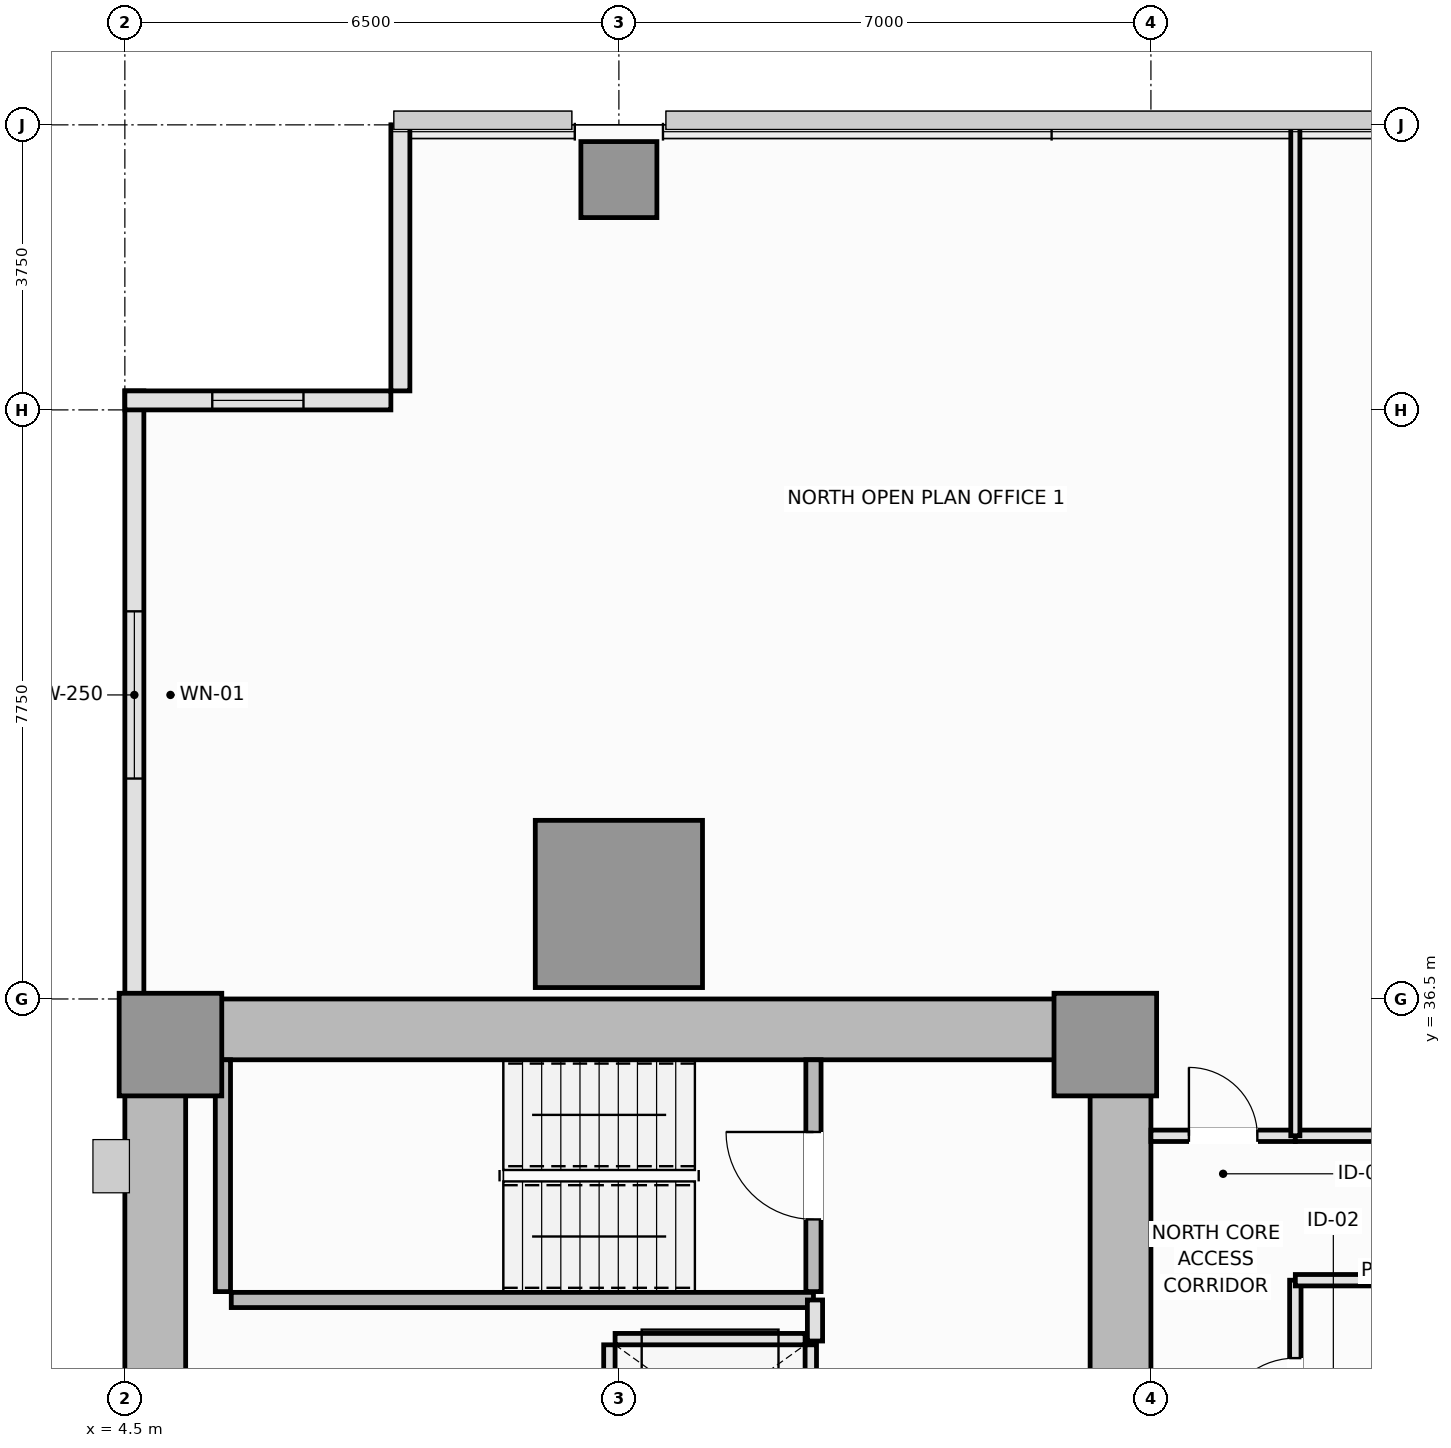
"""IFC4 building model, lengths in metres.
Left out: names, types, materials, properties, quantities, classifications, styles, units other than length and angle.
Written with IfcOpenShell. Run it as: python <this file> out.ifc"""

import sys

from ifc_helpers import new_model, si_unit, direction, frame, frame_2d, origin, origin_2d, place, context, subcontext, project, spatial, rectangle, extrude, element, fill, save


model = new_model("IFC4")
c1 = context("Model", 3, precision=1e-05, world=origin(), true_north=direction((0.0, 1.0)))
c2 = subcontext(c1, "Body", "Model", "MODEL_VIEW")
j1 = project(units=[si_unit("LENGTHUNIT", "METRE"), si_unit("PLANEANGLEUNIT", "RADIAN")], contexts=[c1])
p1 = place(None, origin())
s1 = spatial("IfcSite", under=j1, at=p1, CompositionType="ELEMENT")
p2 = place(p1, origin())
s2 = spatial("IfcBuilding", under=s1, at=p2, CompositionType="ELEMENT")
p3 = place(p2, frame((0.0, 0.0, 75.3)))
s3 = spatial("IfcBuildingStorey", under=s2, at=p3, CompositionType="ELEMENT", Elevation=75.3)
p4 = place(p3, frame((4.5, 36.1, 0.0), z_axis=(0.0, 0.0, 1.0), x_axis=(1.0, 0.0, 0.0)))
e1 = element("IfcWall", 1, at=p4, inside=s3, PredefinedType="SHEAR", context=c2, shape_type="SweptSolid", body=[
    extrude(rectangle(XDim=13.5, YDim=0.8, at=frame_2d((6.75, 0.0))), origin(), (0.0, 0.0, 1.0), 3.55),
])
p5 = place(p3, frame((4.9, 14.8, 0.0), z_axis=(0.0, 0.0, 1.0), x_axis=(0.0, 1.0, 0.0)))
e2 = element("IfcWall", 2, at=p5, inside=s3, PredefinedType="SHEAR", context=c2, shape_type="SweptSolid", body=[
    extrude(rectangle(XDim=20.9, YDim=0.8, at=frame_2d((10.45, 0.0))), origin(), (0.0, 0.0, 1.0), 3.55),
])
p6 = place(p3, frame((17.6, 27.05, 0.0), z_axis=(0.0, 0.0, 1.0), x_axis=(0.0, 1.0, 0.0)))
e3 = element("IfcWall", 3, at=p6, inside=s3, PredefinedType="SHEAR", context=c2, shape_type="SweptSolid", body=[
    extrude(rectangle(XDim=8.65, YDim=0.8, at=frame_2d((4.325, 0.0))), origin(), (0.0, 0.0, 1.0), 3.55),
])
p7 = place(p6, frame((3.45, 0.0, 0.0)))
e4 = element("IfcOpeningElement", 4, at=p7, cuts=e3, PredefinedType="OPENING", context=c2, shape_type="SweptSolid", body=[
    extrude(rectangle(XDim=1.1, YDim=2.15, at=frame_2d((0.55, 1.075))), frame((0.0, 0.41, 0.0), z_axis=(0.0, -1.0, 0.0), x_axis=(1.0, 0.0, 0.0)), (0.0, 0.0, 1.0), 0.82),
])
for number, where, z_axis, x_axis in (
    (5, (5.1, 35.9, 0.0), (0.0, 0.0, 1.0), (1.0, 0.0, 0.0)),
    (6, (17.4, 35.9, 0.0), (0.0, 0.0, 1.0), (1.0, 0.0, 0.0)),
):
    element("IfcColumn", number, at=place(p3, frame(where, z_axis=z_axis, x_axis=x_axis)), inside=s3, PredefinedType="PILASTER", context=c2, shape_type="SweptSolid", body=[
        extrude(rectangle(XDim=1.35, YDim=1.35, at=origin_2d()), origin(), (0.0, 0.0, 1.0), 3.55),
    ])
p8 = place(p3, frame((11.0, 37.75, 0.0), z_axis=(0.0, 0.0, 1.0), x_axis=(1.0, 0.0, 0.0)))
e7 = element("IfcColumn", 7, at=p8, inside=s3, PredefinedType="COLUMN", context=c2, shape_type="SweptSolid", body=[
    extrude(rectangle(XDim=2.2, YDim=2.2, at=origin_2d()), origin(), (0.0, 0.0, 1.0), 3.55),
])
p9 = place(p3, frame((11.0, 47.28, 0.0), z_axis=(0.0, 0.0, 1.0), x_axis=(1.0, 0.0, 0.0)))
e8 = element("IfcColumn", 8, at=p9, inside=s3, PredefinedType="COLUMN", context=c2, shape_type="SweptSolid", body=[
    extrude(rectangle(XDim=1.0, YDim=1.0, at=origin_2d()), origin(), (0.0, 0.0, 1.0), 3.55),
])
p10 = place(p3, frame((4.625, 44.5, 0.0), z_axis=(0.0, 0.0, 1.0), x_axis=(0.0, -1.0, 0.0)))
e9 = element("IfcWall", 9, at=p10, inside=s3, PredefinedType="SOLIDWALL", context=c2, shape_type="SweptSolid", body=[
    extrude(rectangle(XDim=8.0, YDim=0.25, at=frame_2d((4.0, 0.0))), origin(), (0.0, 0.0, 1.0), 3.37),
])
p11 = place(p10, frame((2.9, 0.0, 0.9)))
e10 = element("IfcOpeningElement", 10, at=p11, cuts=e9, PredefinedType="OPENING", context=c2, shape_type="SweptSolid", body=[
    extrude(rectangle(XDim=2.2, YDim=1.8, at=frame_2d((1.1, 0.9))), frame((0.0, 0.135, 0.0), z_axis=(0.0, -1.0, 0.0), x_axis=(1.0, 0.0, 0.0)), (0.0, 0.0, 1.0), 0.27),
])
p12 = place(p3, frame((8.125, 48.0, 0.0), z_axis=(0.0, 0.0, 1.0), x_axis=(0.0, -1.0, 0.0)))
e11 = element("IfcWall", 11, at=p12, inside=s3, PredefinedType="SOLIDWALL", context=c2, shape_type="SweptSolid", body=[
    extrude(rectangle(XDim=3.5, YDim=0.25, at=frame_2d((1.75, 0.0))), origin(), (0.0, 0.0, 1.0), 3.37),
])
p13 = place(p3, frame((8.0, 44.375, 0.0), z_axis=(0.0, 0.0, 1.0), x_axis=(-1.0, 0.0, 0.0)))
e12 = element("IfcWall", 12, at=p13, inside=s3, PredefinedType="SOLIDWALL", context=c2, shape_type="SweptSolid", body=[
    extrude(rectangle(XDim=3.5, YDim=0.25, at=frame_2d((1.75, 0.0))), origin(), (0.0, 0.0, 1.0), 3.37),
])
p14 = place(p13, frame((1.15, 0.0, 0.9)))
e13 = element("IfcOpeningElement", 13, at=p14, cuts=e12, PredefinedType="OPENING", context=c2, shape_type="SweptSolid", body=[
    extrude(rectangle(XDim=1.2, YDim=1.8, at=frame_2d((0.6, 0.9))), frame((0.0, 0.135, 0.0), z_axis=(0.0, -1.0, 0.0), x_axis=(1.0, 0.0, 0.0)), (0.0, 0.0, 1.0), 0.27),
])
p15 = place(p3, frame((5.79, 32.65, 0.0), z_axis=(0.0, 0.0, 1.0), x_axis=(0.0, 1.0, 0.0)))
e14 = element("IfcWall", 14, at=p15, inside=s3, PredefinedType="SOLIDWALL", context=c2, shape_type="SweptSolid", body=[
    extrude(rectangle(XDim=3.05, YDim=0.2, at=frame_2d((1.525, 0.0))), origin(), (0.0, 0.0, 1.0), 3.55),
])
p16 = place(p3, frame((5.9, 32.54, 0.0), z_axis=(0.0, 0.0, 1.0), x_axis=(1.0, 0.0, 0.0)))
e15 = element("IfcWall", 15, at=p16, inside=s3, PredefinedType="SOLIDWALL", context=c2, shape_type="SweptSolid", body=[
    extrude(rectangle(XDim=7.66, YDim=0.2, at=frame_2d((3.83, 0.0))), origin(), (0.0, 0.0, 1.0), 3.55),
])
p17 = place(p3, frame((13.56, 32.65, 0.0), z_axis=(0.0, 0.0, 1.0), x_axis=(0.0, 1.0, 0.0)))
e16 = element("IfcWall", 16, at=p17, inside=s3, PredefinedType="SOLIDWALL", context=c2, shape_type="SweptSolid", body=[
    extrude(rectangle(XDim=3.05, YDim=0.2, at=frame_2d((1.525, 0.0))), origin(), (0.0, 0.0, 1.0), 3.55),
])
p18 = place(p17, frame((0.95, 0.0, 0.0)))
e17 = element("IfcOpeningElement", 17, at=p18, cuts=e16, PredefinedType="OPENING", context=c2, shape_type="SweptSolid", body=[
    extrude(rectangle(XDim=1.15, YDim=2.15, at=frame_2d((0.575, 1.075))), frame((0.0, 0.11, 0.0), z_axis=(0.0, -1.0, 0.0), x_axis=(1.0, 0.0, 0.0)), (0.0, 0.0, 1.0), 0.22),
])
p19 = place(p3, frame((10.95, 32.025, 0.0), z_axis=(0.0, 0.0, 1.0), x_axis=(1.0, 0.0, 0.0)))
e18 = element("IfcWall", 18, at=p19, inside=s3, PredefinedType="PARTITIONING", context=c2, shape_type="SweptSolid", body=[
    extrude(rectangle(XDim=2.5, YDim=0.15, at=frame_2d((1.25, 0.0))), origin(), (0.0, 0.0, 1.0), 3.37),
])
p20 = place(p3, frame((10.875, 30.15, 0.0), z_axis=(0.0, 0.0, 1.0), x_axis=(0.0, 1.0, 0.0)))
e19 = element("IfcWall", 19, at=p20, inside=s3, PredefinedType="PARTITIONING", context=c2, shape_type="SweptSolid", body=[
    extrude(rectangle(XDim=1.8, YDim=0.15, at=frame_2d((0.9, 0.0))), origin(), (0.0, 0.0, 1.0), 3.37),
])
p21 = place(p3, frame((13.525, 30.15, 0.0), z_axis=(0.0, 0.0, 1.0), x_axis=(0.0, 1.0, 0.0)))
e20 = element("IfcWall", 20, at=p21, inside=s3, PredefinedType="PARTITIONING", context=c2, shape_type="SweptSolid", body=[
    extrude(rectangle(XDim=1.8, YDim=0.15, at=frame_2d((0.9, 0.0))), origin(), (0.0, 0.0, 1.0), 3.37),
])
p22 = place(p21, frame((0.35, 0.0, 0.0)))
e21 = element("IfcOpeningElement", 21, at=p22, cuts=e20, PredefinedType="OPENING", context=c2, shape_type="SweptSolid", body=[
    extrude(rectangle(XDim=1.1, YDim=2.2, at=frame_2d((0.55, 1.1))), frame((0.0, 0.085, 0.0), z_axis=(0.0, -1.0, 0.0), x_axis=(1.0, 0.0, 0.0)), (0.0, 0.0, 1.0), 0.17),
])
p23 = place(p3, frame((13.58, 32.0, 0.0), z_axis=(0.0, 0.0, 1.0), x_axis=(0.0, 1.0, 0.0)))
e22 = element("IfcWall", 22, at=p23, inside=s3, PredefinedType="PARTITIONING", context=c2, shape_type="SweptSolid", body=[
    extrude(rectangle(XDim=0.54, YDim=0.2, at=frame_2d((0.27, 0.0))), origin(), (0.0, 0.0, 1.0), 3.37),
])
p24 = place(p3, frame((19.9, 29.75, 0.0), z_axis=(0.0, 0.0, 1.0), x_axis=(0.0, 1.0, 0.0)))
e23 = element("IfcWall", 23, at=p24, inside=s3, PredefinedType="PARTITIONING", context=c2, shape_type="SweptSolid", body=[
    extrude(rectangle(XDim=3.05, YDim=0.15, at=frame_2d((1.525, 0.0))), origin(), (0.0, 0.0, 1.0), 3.37),
])
p25 = place(p24, frame((1.025, 0.0, 0.0)))
e24 = element("IfcOpeningElement", 24, at=p25, cuts=e23, PredefinedType="OPENING", context=c2, shape_type="SweptSolid", body=[
    extrude(rectangle(XDim=1.0, YDim=2.15, at=frame_2d((0.5, 1.075))), frame((0.0, 0.085, 0.0), z_axis=(0.0, -1.0, 0.0), x_axis=(1.0, 0.0, 0.0)), (0.0, 0.0, 1.0), 0.17),
])
p26 = place(p3, frame((19.9, 32.8, 0.0), z_axis=(0.0, 0.0, 1.0), x_axis=(1.0, 0.0, 0.0)))
e25 = element("IfcWall", 25, at=p26, inside=s3, PredefinedType="PARTITIONING", context=c2, shape_type="SweptSolid", body=[
    extrude(rectangle(XDim=1.35, YDim=0.15, at=frame_2d((0.675, 0.0))), origin(), (0.0, 0.0, 1.0), 3.37),
])
p27 = place(p3, frame((18.0, 34.7, 0.0), z_axis=(0.0, 0.0, 1.0), x_axis=(1.0, 0.0, 0.0)))
e26 = element("IfcWall", 26, at=p27, inside=s3, PredefinedType="PARTITIONING", context=c2, shape_type="SweptSolid", body=[
    extrude(rectangle(XDim=1.9, YDim=0.15, at=frame_2d((0.95, 0.0))), origin(), (0.0, 0.0, 1.0), 3.37),
])
p28 = place(p27, frame((0.5, 0.0, 0.0)))
e27 = element("IfcOpeningElement", 27, at=p28, cuts=e26, PredefinedType="OPENING", context=c2, shape_type="SweptSolid", body=[
    extrude(rectangle(XDim=0.9, YDim=2.1, at=frame_2d((0.45, 1.05))), frame((0.0, 0.085, 0.0), z_axis=(0.0, -1.0, 0.0), x_axis=(1.0, 0.0, 0.0)), (0.0, 0.0, 1.0), 0.17),
])
p29 = place(p3, frame((19.9, 34.7, 0.0), z_axis=(0.0, 0.0, 1.0), x_axis=(1.0, 0.0, 0.0)))
e28 = element("IfcWall", 28, at=p29, inside=s3, PredefinedType="PARTITIONING", context=c2, shape_type="SweptSolid", body=[
    extrude(rectangle(XDim=7.6, YDim=0.15, at=frame_2d((3.8, 0.0))), origin(), (0.0, 0.0, 1.0), 3.37),
])
p30 = place(p29, frame((3.3, 0.0, 0.0)))
e29 = element("IfcOpeningElement", 29, at=p30, cuts=e28, PredefinedType="OPENING", context=c2, shape_type="SweptSolid", body=[
    extrude(rectangle(XDim=1.0, YDim=2.15, at=frame_2d((0.5, 1.075))), frame((0.0, 0.085, 0.0), z_axis=(0.0, -1.0, 0.0), x_axis=(1.0, 0.0, 0.0)), (0.0, 0.0, 1.0), 0.17),
])
p31 = place(p3, frame((19.9, 34.7, 0.0), z_axis=(0.0, 0.0, 1.0), x_axis=(0.0, 1.0, 0.0)))
e30 = element("IfcWall", 30, at=p31, inside=s3, PredefinedType="PARTITIONING", context=c2, shape_type="SweptSolid", body=[
    extrude(rectangle(XDim=13.29, YDim=0.12, at=frame_2d((6.645, 0.0))), origin(), (0.0, 0.0, 1.0), 3.37),
])
p32 = place(p11, origin())
e31 = element("IfcWindow", 31, at=p32, inside=s3, PartitioningType="SINGLE_PANEL", PredefinedType="WINDOW", context=c2, shape_type="SweptSolid", body=[
    extrude(rectangle(XDim=2.2, YDim=1.8, at=frame_2d((1.1, 0.9))), frame((0.0, 0.03, 0.0), z_axis=(0.0, -1.0, 0.0), x_axis=(1.0, 0.0, 0.0)), (0.0, 0.0, 1.0), 0.06),
])
fill(e10, e31)
p33 = place(p14, origin())
e32 = element("IfcWindow", 32, at=p33, inside=s3, PartitioningType="SINGLE_PANEL", PredefinedType="WINDOW", context=c2, shape_type="SweptSolid", body=[
    extrude(rectangle(XDim=1.2, YDim=1.8, at=frame_2d((0.6, 0.9))), frame((0.0, 0.03, 0.0), z_axis=(0.0, -1.0, 0.0), x_axis=(1.0, 0.0, 0.0)), (0.0, 0.0, 1.0), 0.06),
])
fill(e13, e32)
p34 = place(p18, origin())
e33 = element("IfcDoor", 33, at=p34, inside=s3, OperationType="SINGLE_SWING_RIGHT", PredefinedType="DOOR", context=c2, shape_type="SweptSolid", body=[
    extrude(rectangle(XDim=1.15, YDim=2.15, at=frame_2d((0.575, 1.075))), frame((0.0, 0.025, 0.0), z_axis=(0.0, -1.0, 0.0), x_axis=(1.0, 0.0, 0.0)), (0.0, 0.0, 1.0), 0.05),
])
fill(e17, e33)
p35 = place(p25, origin())
e34 = element("IfcDoor", 34, at=p35, inside=s3, OperationType="SINGLE_SWING_LEFT", PredefinedType="DOOR", context=c2, shape_type="SweptSolid", body=[
    extrude(rectangle(XDim=1.0, YDim=2.15, at=frame_2d((0.5, 1.075))), frame((0.0, 0.025, 0.0), z_axis=(0.0, -1.0, 0.0), x_axis=(1.0, 0.0, 0.0)), (0.0, 0.0, 1.0), 0.05),
])
fill(e24, e34)
p36 = place(p28, origin())
e35 = element("IfcDoor", 35, at=p36, inside=s3, OperationType="SINGLE_SWING_LEFT", PredefinedType="DOOR", context=c2, shape_type="SweptSolid", body=[
    extrude(rectangle(XDim=0.9, YDim=2.1, at=frame_2d((0.45, 1.05))), frame((0.0, 0.025, 0.0), z_axis=(0.0, -1.0, 0.0), x_axis=(1.0, 0.0, 0.0)), (0.0, 0.0, 1.0), 0.05),
])
fill(e27, e35)
save(model, sys.argv[1])
